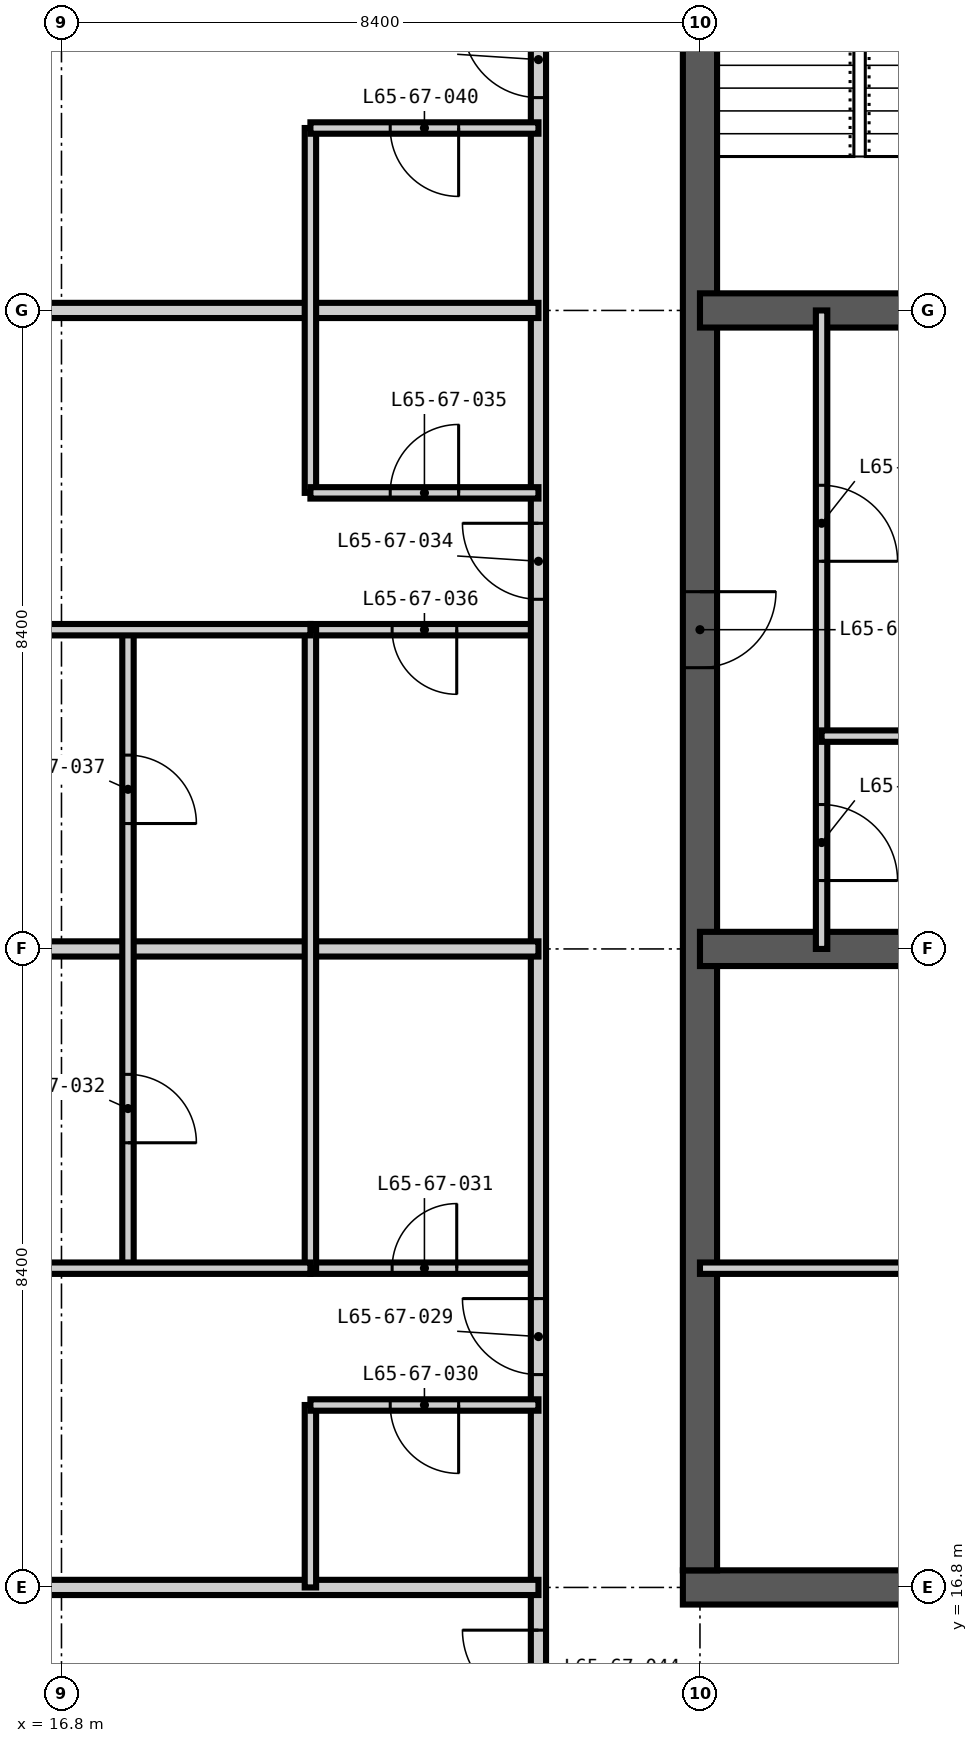
"""IFC4 building model, lengths in metres.
Left out: names, types, materials, properties, quantities, classifications, styles, units other than length and angle.
Written with IfcOpenShell. Run it as: python <this file> out.ifc"""

import sys

from ifc_helpers import new_model, si_unit, direction, frame, frame_2d, origin, place, context, subcontext, project, spatial, rectangle, extrude, element, fill, save


model = new_model("IFC4")
c1 = context("Model", 3, precision=1e-05, world=origin(), true_north=direction((0.0, 1.0)))
c2 = subcontext(c1, "Body", "Model", "MODEL_VIEW")
j1 = project(units=[si_unit("LENGTHUNIT", "METRE"), si_unit("PLANEANGLEUNIT", "RADIAN")], contexts=[c1])
p1 = place(None, origin())
s1 = spatial("IfcSite", under=j1, at=p1, CompositionType="ELEMENT")
p2 = place(p1, origin())
s2 = spatial("IfcBuilding", under=s1, at=p2, CompositionType="ELEMENT")
p3 = place(p2, frame((0.0, 0.0, 252.9)))
s3 = spatial("IfcBuildingStorey", under=s2, at=p3, CompositionType="ELEMENT", Elevation=252.9)
p4 = place(p3, frame((24.975, 16.8, -0.35), z_axis=(0.0, 0.0, 1.0), x_axis=(1.0, 0.0, 0.0)))
e1 = element("IfcWall", 1, at=p4, inside=s3, PredefinedType="SHEAR", context=c2, shape_type="SweptSolid", body=[
    extrude(rectangle(XDim=17.25, YDim=0.45, at=frame_2d((8.625, 0.0))), origin(), (0.0, 0.0, 1.0), 3.9),
])
p5 = place(p4, frame((3.925, 0.0, 0.35)))
e2 = element("IfcOpeningElement", 2, at=p5, cuts=e1, PredefinedType="OPENING", context=c2, shape_type="SweptSolid", body=[
    extrude(rectangle(XDim=1.0, YDim=2.1, at=frame_2d((0.5, 1.05))), frame((0.0, 0.235, 0.0), z_axis=(0.0, -1.0, 0.0), x_axis=(1.0, 0.0, 0.0)), (0.0, 0.0, 1.0), 0.47),
])
p6 = place(p4, frame((10.225, 0.0, 0.35)))
e3 = element("IfcOpeningElement", 3, at=p6, cuts=e1, PredefinedType="OPENING", context=c2, shape_type="SweptSolid", body=[
    extrude(rectangle(XDim=1.0, YDim=2.1, at=frame_2d((0.5, 1.05))), frame((0.0, 0.235, 0.0), z_axis=(0.0, -1.0, 0.0), x_axis=(1.0, 0.0, 0.0)), (0.0, 0.0, 1.0), 0.47),
])
p7 = place(p3, frame((25.2, 41.775, -0.35), z_axis=(0.0, 0.0, 1.0), x_axis=(0.0, -1.0, 0.0)))
e4 = element("IfcWall", 4, at=p7, inside=s3, PredefinedType="SHEAR", context=c2, shape_type="SweptSolid", body=[
    extrude(rectangle(XDim=24.75, YDim=0.45, at=frame_2d((12.375, 0.0))), origin(), (0.0, 0.0, 1.0), 3.9),
])
p8 = place(p7, frame((11.875, 0.0, 0.35)))
e5 = element("IfcOpeningElement", 5, at=p8, cuts=e4, PredefinedType="OPENING", context=c2, shape_type="SweptSolid", body=[
    extrude(rectangle(XDim=1.0, YDim=2.1, at=frame_2d((0.5, 1.05))), frame((0.0, 0.235, 0.0), z_axis=(0.0, -1.0, 0.0), x_axis=(1.0, 0.0, 0.0)), (0.0, 0.0, 1.0), 0.47),
])
for number, where, z_axis, x_axis in (
    (6, (25.2, 25.2, -0.35), (0.0, 0.0, 1.0), (1.0, 0.0, 0.0)),
    (7, (25.2, 33.6, -0.35), (0.0, 0.0, 1.0), (1.0, 0.0, 0.0)),
):
    element("IfcWall", number, at=place(p3, frame(where, z_axis=z_axis, x_axis=x_axis)), inside=s3, PredefinedType="SHEAR", context=c2, shape_type="SweptSolid", body=[
        extrude(rectangle(XDim=16.8, YDim=0.45, at=frame_2d((8.4, 0.0))), origin(), (0.0, 0.0, 1.0), 3.9),
    ])
p9 = place(p3, frame((20.075, 21.0, 0.0), z_axis=(0.0, 0.0, 1.0), x_axis=(1.0, 0.0, 0.0)))
e8 = element("IfcWall", 8, at=p9, inside=s3, PredefinedType="PARTITIONING", context=c2, shape_type="SweptSolid", body=[
    extrude(rectangle(XDim=3.0, YDim=0.15, at=frame_2d((1.5, 0.0))), origin(), (0.0, 0.0, 1.0), 3.55),
])
p10 = place(p9, frame((1.075, 0.0, 0.0)))
e9 = element("IfcOpeningElement", 9, at=p10, cuts=e8, PredefinedType="OPENING", context=c2, shape_type="SweptSolid", body=[
    extrude(rectangle(XDim=0.85, YDim=2.1, at=frame_2d((0.425, 1.05))), frame((0.0, 0.085, 0.0), z_axis=(0.0, -1.0, 0.0), x_axis=(1.0, 0.0, 0.0)), (0.0, 0.0, 1.0), 0.17),
])
p11 = place(p3, frame((20.075, 29.4, 0.0), z_axis=(0.0, 0.0, 1.0), x_axis=(1.0, 0.0, 0.0)))
e10 = element("IfcWall", 10, at=p11, inside=s3, PredefinedType="PARTITIONING", context=c2, shape_type="SweptSolid", body=[
    extrude(rectangle(XDim=3.0, YDim=0.15, at=frame_2d((1.5, 0.0))), origin(), (0.0, 0.0, 1.0), 3.55),
])
p12 = place(p11, frame((1.075, 0.0, 0.0)))
e11 = element("IfcOpeningElement", 11, at=p12, cuts=e10, PredefinedType="OPENING", context=c2, shape_type="SweptSolid", body=[
    extrude(rectangle(XDim=0.85, YDim=2.1, at=frame_2d((0.425, 1.05))), frame((0.0, 0.085, 0.0), z_axis=(0.0, -1.0, 0.0), x_axis=(1.0, 0.0, 0.0)), (0.0, 0.0, 1.0), 0.17),
])
p13 = place(p3, frame((23.075, 14.675, 0.0), z_axis=(0.0, 0.0, 1.0), x_axis=(0.0, 1.0, 0.0)))
e12 = element("IfcWall", 12, at=p13, inside=s3, PredefinedType="PARTITIONING", context=c2, shape_type="SweptSolid", body=[
    extrude(rectangle(XDim=30.65, YDim=0.2, at=frame_2d((15.325, 0.0))), origin(), (0.0, 0.0, 1.0), 3.55),
])
p14 = place(p13, frame((4.925, 0.0, 0.0)))
e13 = element("IfcOpeningElement", 13, at=p14, cuts=e12, PredefinedType="OPENING", context=c2, shape_type="SweptSolid", body=[
    extrude(rectangle(XDim=1.0, YDim=2.2, at=frame_2d((0.5, 1.1))), frame((0.0, 0.11, 0.0), z_axis=(0.0, -1.0, 0.0), x_axis=(1.0, 0.0, 0.0)), (0.0, 0.0, 1.0), 0.22),
])
p15 = place(p13, frame((15.125, 0.0, 0.0)))
e14 = element("IfcOpeningElement", 14, at=p15, cuts=e12, PredefinedType="OPENING", context=c2, shape_type="SweptSolid", body=[
    extrude(rectangle(XDim=1.0, YDim=2.2, at=frame_2d((0.5, 1.1))), frame((0.0, 0.11, 0.0), z_axis=(0.0, -1.0, 0.0), x_axis=(1.0, 0.0, 0.0)), (0.0, 0.0, 1.0), 0.22),
])
p16 = place(p13, frame((21.725, 0.0, 0.0)))
e15 = element("IfcOpeningElement", 15, at=p16, cuts=e12, PredefinedType="OPENING", context=c2, shape_type="SweptSolid", body=[
    extrude(rectangle(XDim=1.0, YDim=2.2, at=frame_2d((0.5, 1.1))), frame((0.0, 0.11, 0.0), z_axis=(0.0, -1.0, 0.0), x_axis=(1.0, 0.0, 0.0)), (0.0, 0.0, 1.0), 0.22),
])
p17 = place(p13, frame((0.563, 0.0, 0.0)))
e16 = element("IfcOpeningElement", 16, at=p17, cuts=e12, PredefinedType="OPENING", context=c2, shape_type="SweptSolid", body=[
    extrude(rectangle(XDim=1.0, YDim=2.2, at=frame_2d((0.5, 1.1))), frame((0.0, 0.11, 0.0), z_axis=(0.0, -1.0, 0.0), x_axis=(1.0, 0.0, 0.0)), (0.0, 0.0, 1.0), 0.22),
])
p18 = place(p13, frame((28.488, 0.0, 0.0)))
e17 = element("IfcOpeningElement", 17, at=p18, cuts=e12, PredefinedType="OPENING", context=c2, shape_type="SweptSolid", body=[
    extrude(rectangle(XDim=1.0, YDim=2.2, at=frame_2d((0.5, 1.1))), frame((0.0, 0.11, 0.0), z_axis=(0.0, -1.0, 0.0), x_axis=(1.0, 0.0, 0.0)), (0.0, 0.0, 1.0), 0.22),
])
for number, where, z_axis, x_axis in (
    (18, (12.582, 16.8, 0.0), (0.0, 0.0, 1.0), (1.0, 0.0, 0.0)),
    (19, (12.582, 25.2, 0.0), (0.0, 0.0, 1.0), (1.0, 0.0, 0.0)),
    (20, (12.582, 33.6, 0.0), (0.0, 0.0, 1.0), (1.0, 0.0, 0.0)),
):
    element("IfcWall", number, at=place(p3, frame(where, z_axis=z_axis, x_axis=x_axis)), inside=s3, PredefinedType="PARTITIONING", context=c2, shape_type="SweptSolid", body=[
        extrude(rectangle(XDim=10.493, YDim=0.2, at=frame_2d((5.247, 0.0))), origin(), (0.0, 0.0, 1.0), 3.55),
    ])
p19 = place(p3, frame((17.675, 21.0, 0.0), z_axis=(0.0, 0.0, 1.0), x_axis=(0.0, 1.0, 0.0)))
e21 = element("IfcWall", 21, at=p19, inside=s3, PredefinedType="PARTITIONING", context=c2, shape_type="SweptSolid", body=[
    extrude(rectangle(XDim=8.4, YDim=0.15, at=frame_2d((4.2, 0.0))), origin(), (0.0, 0.0, 1.0), 3.55),
])
p20 = place(p19, frame((1.65, 0.0, 0.0)))
e22 = element("IfcOpeningElement", 22, at=p20, cuts=e21, PredefinedType="OPENING", context=c2, shape_type="SweptSolid", body=[
    extrude(rectangle(XDim=0.9, YDim=2.1, at=frame_2d((0.45, 1.05))), frame((0.0, 0.085, 0.0), z_axis=(0.0, -1.0, 0.0), x_axis=(1.0, 0.0, 0.0)), (0.0, 0.0, 1.0), 0.17),
])
p21 = place(p19, frame((5.85, 0.0, 0.0)))
e23 = element("IfcOpeningElement", 23, at=p21, cuts=e21, PredefinedType="OPENING", context=c2, shape_type="SweptSolid", body=[
    extrude(rectangle(XDim=0.9, YDim=2.1, at=frame_2d((0.45, 1.05))), frame((0.0, 0.085, 0.0), z_axis=(0.0, -1.0, 0.0), x_axis=(1.0, 0.0, 0.0)), (0.0, 0.0, 1.0), 0.17),
])
p22 = place(p3, frame((20.075, 16.8, 0.0), z_axis=(0.0, 0.0, 1.0), x_axis=(0.0, 1.0, 0.0)))
e24 = element("IfcWall", 24, at=p22, inside=s3, PredefinedType="PARTITIONING", context=c2, shape_type="SweptSolid", body=[
    extrude(rectangle(XDim=2.4, YDim=0.15, at=frame_2d((1.2, 0.0))), origin(), (0.0, 0.0, 1.0), 3.55),
])
p23 = place(p3, frame((20.075, 21.0, 0.0), z_axis=(0.0, 0.0, 1.0), x_axis=(0.0, 1.0, 0.0)))
e25 = element("IfcWall", 25, at=p23, inside=s3, PredefinedType="PARTITIONING", context=c2, shape_type="SweptSolid", body=[
    extrude(rectangle(XDim=8.4, YDim=0.15, at=frame_2d((4.2, 0.0))), origin(), (0.0, 0.0, 1.0), 3.55),
])
p24 = place(p3, frame((20.075, 31.2, 0.0), z_axis=(0.0, 0.0, 1.0), x_axis=(0.0, 1.0, 0.0)))
e26 = element("IfcWall", 26, at=p24, inside=s3, PredefinedType="PARTITIONING", context=c2, shape_type="SweptSolid", body=[
    extrude(rectangle(XDim=4.8, YDim=0.15, at=frame_2d((2.4, 0.0))), origin(), (0.0, 0.0, 1.0), 3.55),
])
p25 = place(p3, frame((26.8, 25.2, 0.0), z_axis=(0.0, 0.0, 1.0), x_axis=(0.0, 1.0, 0.0)))
e27 = element("IfcWall", 27, at=p25, inside=s3, PredefinedType="PARTITIONING", context=c2, shape_type="SweptSolid", body=[
    extrude(rectangle(XDim=8.4, YDim=0.15, at=frame_2d((4.2, 0.0))), origin(), (0.0, 0.0, 1.0), 3.55),
])
p26 = place(p25, frame((0.9, 0.0, 0.0)))
e28 = element("IfcOpeningElement", 28, at=p26, cuts=e27, PredefinedType="OPENING", context=c2, shape_type="SweptSolid", body=[
    extrude(rectangle(XDim=1.0, YDim=2.1, at=frame_2d((0.5, 1.05))), frame((0.0, 0.085, 0.0), z_axis=(0.0, -1.0, 0.0), x_axis=(1.0, 0.0, 0.0)), (0.0, 0.0, 1.0), 0.17),
])
p27 = place(p25, frame((5.1, 0.0, 0.0)))
e29 = element("IfcOpeningElement", 29, at=p27, cuts=e27, PredefinedType="OPENING", context=c2, shape_type="SweptSolid", body=[
    extrude(rectangle(XDim=1.0, YDim=2.1, at=frame_2d((0.5, 1.05))), frame((0.0, 0.085, 0.0), z_axis=(0.0, -1.0, 0.0), x_axis=(1.0, 0.0, 0.0)), (0.0, 0.0, 1.0), 0.17),
])
p28 = place(p3, frame((20.075, 19.2, 0.0), z_axis=(0.0, 0.0, 1.0), x_axis=(1.0, 0.0, 0.0)))
e30 = element("IfcWall", 30, at=p28, inside=s3, PredefinedType="PARTITIONING", context=c2, shape_type="SweptSolid", body=[
    extrude(rectangle(XDim=3.0, YDim=0.15, at=frame_2d((1.5, 0.0))), origin(), (0.0, 0.0, 1.0), 3.55),
])
p29 = place(p28, frame((1.05, 0.0, 0.0)))
e31 = element("IfcOpeningElement", 31, at=p29, cuts=e30, PredefinedType="OPENING", context=c2, shape_type="SweptSolid", body=[
    extrude(rectangle(XDim=0.9, YDim=2.1, at=frame_2d((0.45, 1.05))), frame((0.0, 0.085, 0.0), z_axis=(0.0, -1.0, 0.0), x_axis=(1.0, 0.0, 0.0)), (0.0, 0.0, 1.0), 0.17),
])
p30 = place(p3, frame((12.582, 21.0, 0.0), z_axis=(0.0, 0.0, 1.0), x_axis=(1.0, 0.0, 0.0)))
e32 = element("IfcWall", 32, at=p30, inside=s3, PredefinedType="PARTITIONING", context=c2, shape_type="SweptSolid", body=[
    extrude(rectangle(XDim=7.493, YDim=0.15, at=frame_2d((3.747, 0.0))), origin(), (0.0, 0.0, 1.0), 3.55),
])
p31 = place(p30, frame((2.106, 0.0, 0.0)))
e33 = element("IfcOpeningElement", 33, at=p31, cuts=e32, PredefinedType="OPENING", context=c2, shape_type="SweptSolid", body=[
    extrude(rectangle(XDim=0.9, YDim=2.1, at=frame_2d((0.45, 1.05))), frame((0.0, 0.085, 0.0), z_axis=(0.0, -1.0, 0.0), x_axis=(1.0, 0.0, 0.0)), (0.0, 0.0, 1.0), 0.17),
])
p32 = place(p3, frame((25.2, 21.0, 0.0), z_axis=(0.0, 0.0, 1.0), x_axis=(1.0, 0.0, 0.0)))
e34 = element("IfcWall", 34, at=p32, inside=s3, PredefinedType="PARTITIONING", context=c2, shape_type="SweptSolid", body=[
    extrude(rectangle(XDim=8.4, YDim=0.15, at=frame_2d((4.2, 0.0))), origin(), (0.0, 0.0, 1.0), 3.55),
])
p33 = place(p32, frame((3.7, 0.0, 0.0)))
e35 = element("IfcOpeningElement", 35, at=p33, cuts=e34, PredefinedType="OPENING", context=c2, shape_type="SweptSolid", body=[
    extrude(rectangle(XDim=1.0, YDim=2.1, at=frame_2d((0.5, 1.05))), frame((0.0, 0.085, 0.0), z_axis=(0.0, -1.0, 0.0), x_axis=(1.0, 0.0, 0.0)), (0.0, 0.0, 1.0), 0.17),
])
p34 = place(p3, frame((26.8, 28.0, 0.0), z_axis=(0.0, 0.0, 1.0), x_axis=(1.0, 0.0, 0.0)))
e36 = element("IfcWall", 36, at=p34, inside=s3, PredefinedType="PARTITIONING", context=c2, shape_type="SweptSolid", body=[
    extrude(rectangle(XDim=6.8, YDim=0.15, at=frame_2d((3.4, 0.0))), origin(), (0.0, 0.0, 1.0), 3.55),
])
p35 = place(p3, frame((12.582, 29.4, 0.0), z_axis=(0.0, 0.0, 1.0), x_axis=(1.0, 0.0, 0.0)))
e37 = element("IfcWall", 37, at=p35, inside=s3, PredefinedType="PARTITIONING", context=c2, shape_type="SweptSolid", body=[
    extrude(rectangle(XDim=7.493, YDim=0.15, at=frame_2d((3.747, 0.0))), origin(), (0.0, 0.0, 1.0), 3.55),
])
p36 = place(p35, frame((2.106, 0.0, 0.0)))
e38 = element("IfcOpeningElement", 38, at=p36, cuts=e37, PredefinedType="OPENING", context=c2, shape_type="SweptSolid", body=[
    extrude(rectangle(XDim=0.9, YDim=2.1, at=frame_2d((0.45, 1.05))), frame((0.0, 0.085, 0.0), z_axis=(0.0, -1.0, 0.0), x_axis=(1.0, 0.0, 0.0)), (0.0, 0.0, 1.0), 0.17),
])
p37 = place(p3, frame((20.075, 31.2, 0.0), z_axis=(0.0, 0.0, 1.0), x_axis=(1.0, 0.0, 0.0)))
e39 = element("IfcWall", 39, at=p37, inside=s3, PredefinedType="PARTITIONING", context=c2, shape_type="SweptSolid", body=[
    extrude(rectangle(XDim=3.0, YDim=0.15, at=frame_2d((1.5, 0.0))), origin(), (0.0, 0.0, 1.0), 3.55),
])
p38 = place(p37, frame((1.05, 0.0, 0.0)))
e40 = element("IfcOpeningElement", 40, at=p38, cuts=e39, PredefinedType="OPENING", context=c2, shape_type="SweptSolid", body=[
    extrude(rectangle(XDim=0.9, YDim=2.1, at=frame_2d((0.45, 1.05))), frame((0.0, 0.085, 0.0), z_axis=(0.0, -1.0, 0.0), x_axis=(1.0, 0.0, 0.0)), (0.0, 0.0, 1.0), 0.17),
])
p39 = place(p3, frame((20.075, 36.0, 0.0), z_axis=(0.0, 0.0, 1.0), x_axis=(1.0, 0.0, 0.0)))
e41 = element("IfcWall", 41, at=p39, inside=s3, PredefinedType="PARTITIONING", context=c2, shape_type="SweptSolid", body=[
    extrude(rectangle(XDim=3.0, YDim=0.15, at=frame_2d((1.5, 0.0))), origin(), (0.0, 0.0, 1.0), 3.55),
])
p40 = place(p39, frame((1.05, 0.0, 0.0)))
e42 = element("IfcOpeningElement", 42, at=p40, cuts=e41, PredefinedType="OPENING", context=c2, shape_type="SweptSolid", body=[
    extrude(rectangle(XDim=0.9, YDim=2.1, at=frame_2d((0.45, 1.05))), frame((0.0, 0.085, 0.0), z_axis=(0.0, -1.0, 0.0), x_axis=(1.0, 0.0, 0.0)), (0.0, 0.0, 1.0), 0.17),
])
p41 = place(p14, origin())
e43 = element("IfcDoor", 43, at=p41, inside=s3, OperationType="SINGLE_SWING_RIGHT", PredefinedType="DOOR", context=c2, shape_type="SweptSolid", body=[
    extrude(rectangle(XDim=1.0, YDim=2.2, at=frame_2d((0.5, 1.1))), frame((0.0, 0.025, 0.0), z_axis=(0.0, -1.0, 0.0), x_axis=(1.0, 0.0, 0.0)), (0.0, 0.0, 1.0), 0.05),
])
fill(e13, e43)
p42 = place(p29, frame((0.9, 0.0, 0.0), z_axis=(0.0, 0.0, 1.0), x_axis=(-1.0, 0.0, 0.0)))
e44 = element("IfcDoor", 44, at=p42, inside=s3, OperationType="SINGLE_SWING_LEFT", PredefinedType="DOOR", context=c2, shape_type="SweptSolid", body=[
    extrude(rectangle(XDim=0.9, YDim=2.1, at=frame_2d((0.45, 1.05))), frame((0.0, 0.025, 0.0), z_axis=(0.0, -1.0, 0.0), x_axis=(1.0, 0.0, 0.0)), (0.0, 0.0, 1.0), 0.05),
])
fill(e31, e44)
p43 = place(p10, origin())
e45 = element("IfcDoor", 45, at=p43, inside=s3, OperationType="SINGLE_SWING_RIGHT", PredefinedType="DOOR", context=c2, shape_type="SweptSolid", body=[
    extrude(rectangle(XDim=0.85, YDim=2.1, at=frame_2d((0.425, 1.05))), frame((0.0, 0.025, 0.0), z_axis=(0.0, -1.0, 0.0), x_axis=(1.0, 0.0, 0.0)), (0.0, 0.0, 1.0), 0.05),
])
fill(e9, e45)
p44 = place(p20, frame((0.9, 0.0, 0.0), z_axis=(0.0, 0.0, 1.0), x_axis=(-1.0, 0.0, 0.0)))
e46 = element("IfcDoor", 46, at=p44, inside=s3, OperationType="SINGLE_SWING_RIGHT", PredefinedType="DOOR", context=c2, shape_type="SweptSolid", body=[
    extrude(rectangle(XDim=0.9, YDim=2.1, at=frame_2d((0.45, 1.05))), frame((0.0, 0.025, 0.0), z_axis=(0.0, -1.0, 0.0), x_axis=(1.0, 0.0, 0.0)), (0.0, 0.0, 1.0), 0.05),
])
fill(e22, e46)
p45 = place(p15, origin())
e47 = element("IfcDoor", 47, at=p45, inside=s3, OperationType="SINGLE_SWING_RIGHT", PredefinedType="DOOR", context=c2, shape_type="SweptSolid", body=[
    extrude(rectangle(XDim=1.0, YDim=2.2, at=frame_2d((0.5, 1.1))), frame((0.0, 0.025, 0.0), z_axis=(0.0, -1.0, 0.0), x_axis=(1.0, 0.0, 0.0)), (0.0, 0.0, 1.0), 0.05),
])
fill(e14, e47)
p46 = place(p38, origin())
e48 = element("IfcDoor", 48, at=p46, inside=s3, OperationType="SINGLE_SWING_RIGHT", PredefinedType="DOOR", context=c2, shape_type="SweptSolid", body=[
    extrude(rectangle(XDim=0.9, YDim=2.1, at=frame_2d((0.45, 1.05))), frame((0.0, 0.025, 0.0), z_axis=(0.0, -1.0, 0.0), x_axis=(1.0, 0.0, 0.0)), (0.0, 0.0, 1.0), 0.05),
])
fill(e40, e48)
p47 = place(p12, frame((0.85, 0.0, 0.0), z_axis=(0.0, 0.0, 1.0), x_axis=(-1.0, 0.0, 0.0)))
e49 = element("IfcDoor", 49, at=p47, inside=s3, OperationType="SINGLE_SWING_LEFT", PredefinedType="DOOR", context=c2, shape_type="SweptSolid", body=[
    extrude(rectangle(XDim=0.85, YDim=2.1, at=frame_2d((0.425, 1.05))), frame((0.0, 0.025, 0.0), z_axis=(0.0, -1.0, 0.0), x_axis=(1.0, 0.0, 0.0)), (0.0, 0.0, 1.0), 0.05),
])
fill(e11, e49)
p48 = place(p21, frame((0.9, 0.0, 0.0), z_axis=(0.0, 0.0, 1.0), x_axis=(-1.0, 0.0, 0.0)))
e50 = element("IfcDoor", 50, at=p48, inside=s3, OperationType="SINGLE_SWING_RIGHT", PredefinedType="DOOR", context=c2, shape_type="SweptSolid", body=[
    extrude(rectangle(XDim=0.9, YDim=2.1, at=frame_2d((0.45, 1.05))), frame((0.0, 0.025, 0.0), z_axis=(0.0, -1.0, 0.0), x_axis=(1.0, 0.0, 0.0)), (0.0, 0.0, 1.0), 0.05),
])
fill(e23, e50)
p49 = place(p16, origin())
e51 = element("IfcDoor", 51, at=p49, inside=s3, OperationType="SINGLE_SWING_RIGHT", PredefinedType="DOOR", context=c2, shape_type="SweptSolid", body=[
    extrude(rectangle(XDim=1.0, YDim=2.2, at=frame_2d((0.5, 1.1))), frame((0.0, 0.025, 0.0), z_axis=(0.0, -1.0, 0.0), x_axis=(1.0, 0.0, 0.0)), (0.0, 0.0, 1.0), 0.05),
])
fill(e15, e51)
p50 = place(p40, frame((0.9, 0.0, 0.0), z_axis=(0.0, 0.0, 1.0), x_axis=(-1.0, 0.0, 0.0)))
e52 = element("IfcDoor", 52, at=p50, inside=s3, OperationType="SINGLE_SWING_LEFT", PredefinedType="DOOR", context=c2, shape_type="SweptSolid", body=[
    extrude(rectangle(XDim=0.9, YDim=2.1, at=frame_2d((0.45, 1.05))), frame((0.0, 0.025, 0.0), z_axis=(0.0, -1.0, 0.0), x_axis=(1.0, 0.0, 0.0)), (0.0, 0.0, 1.0), 0.05),
])
fill(e42, e52)
p51 = place(p17, origin())
e53 = element("IfcDoor", 53, at=p51, inside=s3, OperationType="SINGLE_SWING_RIGHT", PredefinedType="DOOR", context=c2, shape_type="SweptSolid", body=[
    extrude(rectangle(XDim=1.0, YDim=2.2, at=frame_2d((0.5, 1.1))), frame((0.0, 0.025, 0.0), z_axis=(0.0, -1.0, 0.0), x_axis=(1.0, 0.0, 0.0)), (0.0, 0.0, 1.0), 0.05),
])
fill(e16, e53)
p52 = place(p8, origin())
e54 = element("IfcDoor", 54, at=p52, inside=s3, OperationType="SINGLE_SWING_LEFT", PredefinedType="DOOR", context=c2, shape_type="SweptSolid", body=[
    extrude(rectangle(XDim=1.0, YDim=2.1, at=frame_2d((0.5, 1.05))), frame((0.0, 0.025, 0.0), z_axis=(0.0, -1.0, 0.0), x_axis=(1.0, 0.0, 0.0)), (0.0, 0.0, 1.0), 0.05),
])
fill(e5, e54)
p53 = place(p26, frame((1.0, 0.0, 0.0), z_axis=(0.0, 0.0, 1.0), x_axis=(-1.0, 0.0, 0.0)))
e55 = element("IfcDoor", 55, at=p53, inside=s3, OperationType="SINGLE_SWING_RIGHT", PredefinedType="DOOR", context=c2, shape_type="SweptSolid", body=[
    extrude(rectangle(XDim=1.0, YDim=2.1, at=frame_2d((0.5, 1.05))), frame((0.0, 0.025, 0.0), z_axis=(0.0, -1.0, 0.0), x_axis=(1.0, 0.0, 0.0)), (0.0, 0.0, 1.0), 0.05),
])
fill(e28, e55)
p54 = place(p27, frame((1.0, 0.0, 0.0), z_axis=(0.0, 0.0, 1.0), x_axis=(-1.0, 0.0, 0.0)))
e56 = element("IfcDoor", 56, at=p54, inside=s3, OperationType="SINGLE_SWING_RIGHT", PredefinedType="DOOR", context=c2, shape_type="SweptSolid", body=[
    extrude(rectangle(XDim=1.0, YDim=2.1, at=frame_2d((0.5, 1.05))), frame((0.0, 0.025, 0.0), z_axis=(0.0, -1.0, 0.0), x_axis=(1.0, 0.0, 0.0)), (0.0, 0.0, 1.0), 0.05),
])
fill(e29, e56)
save(model, sys.argv[1])
